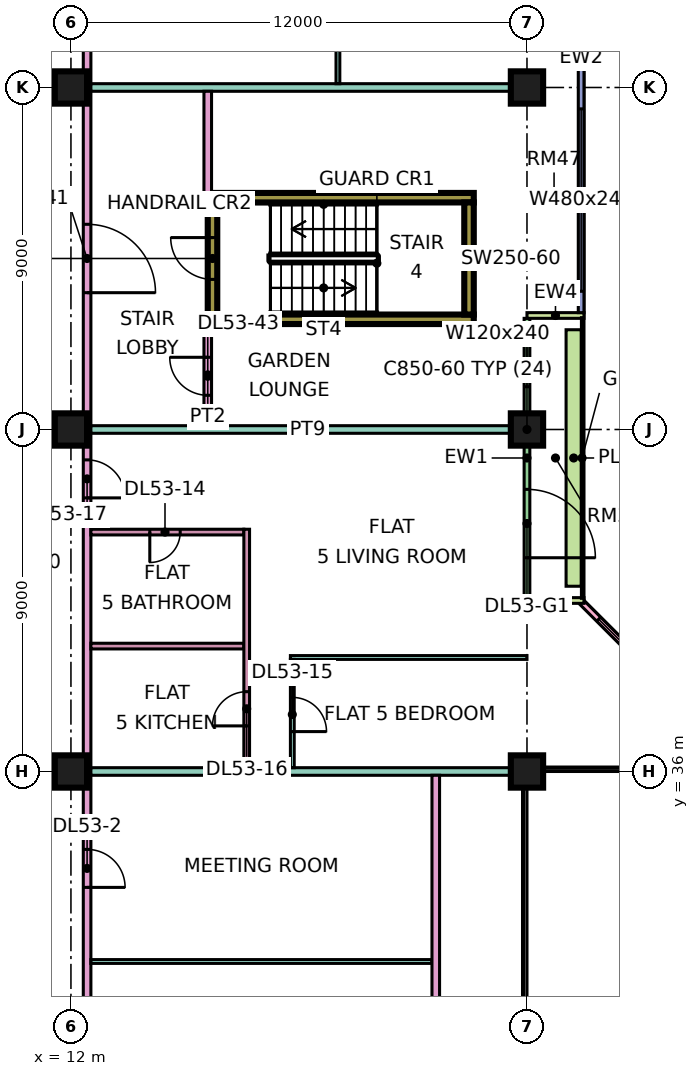
"""IFC4 building model, lengths in metres.
Left out: names, types, materials, properties, quantities, classifications, styles, units other than length and angle.
Written with IfcOpenShell. Run it as: python <this file> out.ifc"""

import sys

from ifc_helpers import new_model, si_unit, direction, frame, frame_2d, origin, origin_2d, place, context, subcontext, project, spatial, rectangle, extrude, element, fill, save


model = new_model("IFC4")
c1 = context("Model", 3, precision=1e-05, world=origin(), true_north=direction((0.0, 1.0)))
c2 = subcontext(c1, "Body", "Model", "MODEL_VIEW")
j1 = project(units=[si_unit("LENGTHUNIT", "METRE"), si_unit("PLANEANGLEUNIT", "RADIAN")], contexts=[c1])
p1 = place(None, origin())
s1 = spatial("IfcSite", under=j1, at=p1, CompositionType="ELEMENT")
p2 = place(p1, origin())
s2 = spatial("IfcBuilding", under=s1, at=p2, CompositionType="ELEMENT")
p3 = place(p2, frame((0.0, 0.0, 226.65)))
s3 = spatial("IfcBuildingStorey", under=s2, at=p3, CompositionType="ELEMENT", Elevation=226.65)
for number, where, z_axis, x_axis in (
    (1, (12.0, 36.0, 0.0), (0.0, 0.0, 1.0), (1.0, 0.0, 0.0)),
    (2, (12.0, 45.0, 0.0), (0.0, 0.0, 1.0), (1.0, 0.0, 0.0)),
    (3, (12.0, 54.0, 0.0), (0.0, 0.0, 1.0), (1.0, 0.0, 0.0)),
    (4, (24.0, 36.0, 0.0), (0.0, 0.0, 1.0), (1.0, 0.0, 0.0)),
    (5, (24.0, 45.0, 0.0), (0.0, 0.0, 1.0), (1.0, 0.0, 0.0)),
    (6, (24.0, 54.0, 0.0), (0.0, 0.0, 1.0), (1.0, 0.0, 0.0)),
):
    element("IfcColumn", number, at=place(p3, frame(where, z_axis=z_axis, x_axis=x_axis)), inside=s3, PredefinedType="COLUMN", context=c2, shape_type="SweptSolid", body=[
        extrude(rectangle(XDim=0.85, YDim=0.85, at=origin_2d()), origin(), (0.0, 0.0, 1.0), 3.75),
    ])
for number, where, z_axis, x_axis in (
    (7, (15.6, 47.9, 0.0), (0.0, 0.0, 1.0), (1.0, 0.0, 0.0)),
    (8, (15.6, 51.1, 0.0), (0.0, 0.0, 1.0), (1.0, 0.0, 0.0)),
):
    element("IfcWall", number, at=place(p3, frame(where, z_axis=z_axis, x_axis=x_axis)), inside=s3, PredefinedType="SHEAR", context=c2, shape_type="SweptSolid", body=[
        extrude(rectangle(XDim=7.0, YDim=0.25, at=frame_2d((3.5, 0.0))), origin(), (0.0, 0.0, 1.0), 3.75),
    ])
p4 = place(p3, frame((15.725, 48.025, 0.0), z_axis=(0.0, 0.0, 1.0), x_axis=(0.0, 1.0, 0.0)))
e9 = element("IfcWall", 9, at=p4, inside=s3, PredefinedType="SHEAR", context=c2, shape_type="SweptSolid", body=[
    extrude(rectangle(XDim=2.95, YDim=0.25, at=frame_2d((1.475, 0.0))), origin(), (0.0, 0.0, 1.0), 3.75),
])
p5 = place(p4, frame((0.925, 0.0, 0.0)))
e10 = element("IfcOpeningElement", 10, at=p5, cuts=e9, PredefinedType="OPENING", context=c2, shape_type="SweptSolid", body=[
    extrude(rectangle(XDim=1.1, YDim=2.2, at=frame_2d((0.55, 1.1))), frame((0.0, 0.135, 0.0), z_axis=(0.0, -1.0, 0.0), x_axis=(1.0, 0.0, 0.0)), (0.0, 0.0, 1.0), 0.27),
])
p6 = place(p3, frame((22.475, 48.025, 0.0), z_axis=(0.0, 0.0, 1.0), x_axis=(0.0, 1.0, 0.0)))
e11 = element("IfcWall", 11, at=p6, inside=s3, PredefinedType="SHEAR", context=c2, shape_type="SweptSolid", body=[
    extrude(rectangle(XDim=2.95, YDim=0.25, at=frame_2d((1.475, 0.0))), origin(), (0.0, 0.0, 1.0), 3.75),
])
p7 = place(p3, frame((28.447, 37.447, 0.0), z_axis=(0.0, 0.0, 1.0), x_axis=(-0.707106781187, 0.707106781187, 0.0)))
e12 = element("IfcWall", 12, at=p7, inside=s3, PredefinedType="SOLIDWALL", context=c2, shape_type="SweptSolid", body=[
    extrude(rectangle(XDim=4.243, YDim=0.15, at=frame_2d((2.121, 0.0))), origin(), (0.0, 0.0, 1.0), 3.35),
])
p8 = place(p7, frame((0.621, 0.0, 0.45)))
e13 = element("IfcOpeningElement", 13, at=p8, cuts=e12, PredefinedType="OPENING", context=c2, shape_type="SweptSolid", body=[
    extrude(rectangle(XDim=3.0, YDim=2.4, at=frame_2d((1.5, 1.2))), frame((0.0, 0.085, 0.0), z_axis=(0.0, -1.0, 0.0), x_axis=(1.0, 0.0, 0.0)), (0.0, 0.0, 1.0), 0.17),
])
p9 = place(p3, frame((24.0, 40.575, 0.0), z_axis=(0.0, 0.0, 1.0), x_axis=(0.0, 1.0, 0.0)))
e14 = element("IfcWall", 14, at=p9, inside=s3, PredefinedType="SOLIDWALL", context=c2, shape_type="SweptSolid", body=[
    extrude(rectangle(XDim=7.35, YDim=0.15, at=frame_2d((3.675, 0.0))), origin(), (0.0, 0.0, 1.0), 3.35),
])
p10 = place(p9, frame((1.05, 0.0, 0.0)))
e15 = element("IfcOpeningElement", 15, at=p10, cuts=e14, PredefinedType="OPENING", context=c2, shape_type="SweptSolid", body=[
    extrude(rectangle(XDim=1.8, YDim=2.4, at=frame_2d((0.9, 1.2))), frame((0.0, 0.085, 0.0), z_axis=(0.0, -1.0, 0.0), x_axis=(1.0, 0.0, 0.0)), (0.0, 0.0, 1.0), 0.17),
])
p11 = place(p9, frame((5.55, 0.0, 0.45)))
e16 = element("IfcOpeningElement", 16, at=p11, cuts=e14, PredefinedType="OPENING", context=c2, shape_type="SweptSolid", body=[
    extrude(rectangle(XDim=1.2, YDim=2.4, at=frame_2d((0.6, 1.2))), frame((0.0, 0.085, 0.0), z_axis=(0.0, -1.0, 0.0), x_axis=(1.0, 0.0, 0.0)), (0.0, 0.0, 1.0), 0.17),
])
for number, where, z_axis, x_axis in (
    (17, (25.5, 40.5, 0.0), (0.0, 0.0, 1.0), (-1.0, 0.0, 0.0)),
    (18, (25.5, 48.0, 0.0), (0.0, 0.0, 1.0), (-1.0, 0.0, 0.0)),
):
    element("IfcWall", number, at=place(p3, frame(where, z_axis=z_axis, x_axis=x_axis)), inside=s3, PredefinedType="SOLIDWALL", context=c2, shape_type="SweptSolid", body=[
        extrude(rectangle(XDim=1.5, YDim=0.15, at=frame_2d((0.75, 0.0))), origin(), (0.0, 0.0, 1.0), 3.35),
    ])
p12 = place(p3, frame((25.425, 48.075, 0.0), z_axis=(0.0, 0.0, 1.0), x_axis=(0.0, 1.0, 0.0)))
e19 = element("IfcWall", 19, at=p12, inside=s3, PredefinedType="SOLIDWALL", context=c2, shape_type="SweptSolid", body=[
    extrude(rectangle(XDim=13.425, YDim=0.15, at=frame_2d((6.712, 0.0))), origin(), (0.0, 0.0, 1.0), 3.35),
])
p13 = place(p12, frame((0.562, 0.0, 0.45)))
e20 = element("IfcOpeningElement", 20, at=p13, cuts=e19, PredefinedType="OPENING", context=c2, shape_type="SweptSolid", body=[
    extrude(rectangle(XDim=4.8, YDim=2.4, at=frame_2d((2.4, 1.2))), frame((0.0, 0.085, 0.0), z_axis=(0.0, -1.0, 0.0), x_axis=(1.0, 0.0, 0.0)), (0.0, 0.0, 1.0), 0.17),
])
p14 = place(p12, frame((6.525, 0.0, 0.45)))
e21 = element("IfcOpeningElement", 21, at=p14, cuts=e19, PredefinedType="OPENING", context=c2, shape_type="SweptSolid", body=[
    extrude(rectangle(XDim=1.8, YDim=2.4, at=frame_2d((0.9, 1.2))), frame((0.0, 0.085, 0.0), z_axis=(0.0, -1.0, 0.0), x_axis=(1.0, 0.0, 0.0)), (0.0, 0.0, 1.0), 0.17),
])
p15 = place(p12, frame((9.675, 0.0, 0.45)))
e22 = element("IfcOpeningElement", 22, at=p15, cuts=e19, PredefinedType="OPENING", context=c2, shape_type="SweptSolid", body=[
    extrude(rectangle(XDim=3.0, YDim=2.4, at=frame_2d((1.5, 1.2))), frame((0.0, 0.085, 0.0), z_axis=(0.0, -1.0, 0.0), x_axis=(1.0, 0.0, 0.0)), (0.0, 0.0, 1.0), 0.17),
])
p16 = place(p3, frame((25.229, 40.875, 0.0), z_axis=(0.0, 0.0, 1.0), x_axis=(0.0, 1.0, 0.0)))
e23 = element("IfcWall", 23, at=p16, inside=s3, PredefinedType="SOLIDWALL", context=c2, shape_type="SweptSolid", body=[
    extrude(rectangle(XDim=6.75, YDim=0.4, at=frame_2d((3.375, 0.0))), origin(), (0.0, 0.0, 1.0), 0.7),
])
p17 = place(p3, frame((12.425, 20.0, 0.0), z_axis=(0.0, 0.0, 1.0), x_axis=(0.0, 1.0, 0.0)))
e24 = element("IfcWall", 24, at=p17, inside=s3, PredefinedType="PARTITIONING", context=c2, shape_type="SweptSolid", body=[
    extrude(rectangle(XDim=42.926, YDim=0.2, at=frame_2d((21.463, 0.0))), origin(), (0.0, 0.0, 1.0), 3.35),
])
p18 = place(p17, frame((6.7, 0.0, 0.0)))
e25 = element("IfcOpeningElement", 25, at=p18, cuts=e24, PredefinedType="OPENING", context=c2, shape_type="SweptSolid", body=[
    extrude(rectangle(XDim=1.6, YDim=2.1, at=frame_2d((0.8, 1.05))), frame((0.0, 0.11, 0.0), z_axis=(0.0, -1.0, 0.0), x_axis=(1.0, 0.0, 0.0)), (0.0, 0.0, 1.0), 0.22),
])
p19 = place(p17, frame((12.95, 0.0, 0.0)))
e26 = element("IfcOpeningElement", 26, at=p19, cuts=e24, PredefinedType="OPENING", context=c2, shape_type="SweptSolid", body=[
    extrude(rectangle(XDim=1.0, YDim=2.1, at=frame_2d((0.5, 1.05))), frame((0.0, 0.11, 0.0), z_axis=(0.0, -1.0, 0.0), x_axis=(1.0, 0.0, 0.0)), (0.0, 0.0, 1.0), 0.22),
])
p20 = place(p17, frame((23.2, 0.0, 0.0)))
e27 = element("IfcOpeningElement", 27, at=p20, cuts=e24, PredefinedType="OPENING", context=c2, shape_type="SweptSolid", body=[
    extrude(rectangle(XDim=1.0, YDim=2.1, at=frame_2d((0.5, 1.05))), frame((0.0, 0.11, 0.0), z_axis=(0.0, -1.0, 0.0), x_axis=(1.0, 0.0, 0.0)), (0.0, 0.0, 1.0), 0.22),
])
p21 = place(p17, frame((35.35, 0.0, 0.0)))
e28 = element("IfcOpeningElement", 28, at=p21, cuts=e24, PredefinedType="OPENING", context=c2, shape_type="SweptSolid", body=[
    extrude(rectangle(XDim=1.0, YDim=2.1, at=frame_2d((0.5, 1.05))), frame((0.0, 0.11, 0.0), z_axis=(0.0, -1.0, 0.0), x_axis=(1.0, 0.0, 0.0)), (0.0, 0.0, 1.0), 0.22),
])
p22 = place(p17, frame((1.15, 0.0, 0.0)))
e29 = element("IfcOpeningElement", 29, at=p22, cuts=e24, PredefinedType="OPENING", context=c2, shape_type="SweptSolid", body=[
    extrude(rectangle(XDim=1.8, YDim=2.1, at=frame_2d((0.9, 1.05))), frame((0.0, 0.11, 0.0), z_axis=(0.0, -1.0, 0.0), x_axis=(1.0, 0.0, 0.0)), (0.0, 0.0, 1.0), 0.22),
])
p23 = place(p17, frame((28.6, 0.0, 0.0)))
e30 = element("IfcOpeningElement", 30, at=p23, cuts=e24, PredefinedType="OPENING", context=c2, shape_type="SweptSolid", body=[
    extrude(rectangle(XDim=1.8, YDim=2.1, at=frame_2d((0.9, 1.05))), frame((0.0, 0.11, 0.0), z_axis=(0.0, -1.0, 0.0), x_axis=(1.0, 0.0, 0.0)), (0.0, 0.0, 1.0), 0.22),
])
p24 = place(p3, frame((12.525, 31.0, 0.0), z_axis=(0.0, 0.0, 1.0), x_axis=(1.0, 0.0, 0.0)))
e31 = element("IfcWall", 31, at=p24, inside=s3, PredefinedType="PARTITIONING", context=c2, shape_type="SweptSolid", body=[
    extrude(rectangle(XDim=8.975, YDim=0.1, at=frame_2d((4.488, 0.0))), origin(), (0.0, 0.0, 1.0), 3.35),
])
p25 = place(p3, frame((12.525, 36.0, 0.0), z_axis=(0.0, 0.0, 1.0), x_axis=(1.0, 0.0, 0.0)))
e32 = element("IfcWall", 32, at=p25, inside=s3, PredefinedType="PARTITIONING", context=c2, shape_type="SweptSolid", body=[
    extrude(rectangle(XDim=11.475, YDim=0.2, at=frame_2d((5.738, 0.0))), origin(), (0.0, 0.0, 1.0), 3.35),
])
p26 = place(p3, frame((12.525, 39.3, 0.0), z_axis=(0.0, 0.0, 1.0), x_axis=(1.0, 0.0, 0.0)))
e33 = element("IfcWall", 33, at=p26, inside=s3, PredefinedType="PARTITIONING", context=c2, shape_type="SweptSolid", body=[
    extrude(rectangle(XDim=4.025, YDim=0.15, at=frame_2d((2.013, 0.0))), origin(), (0.0, 0.0, 1.0), 3.35),
])
p27 = place(p3, frame((12.525, 42.3, 0.0), z_axis=(0.0, 0.0, 1.0), x_axis=(1.0, 0.0, 0.0)))
e34 = element("IfcWall", 34, at=p27, inside=s3, PredefinedType="PARTITIONING", context=c2, shape_type="SweptSolid", body=[
    extrude(rectangle(XDim=4.025, YDim=0.15, at=frame_2d((2.013, 0.0))), origin(), (0.0, 0.0, 1.0), 3.35),
])
p28 = place(p27, frame((1.55, 0.0, 0.0)))
e35 = element("IfcOpeningElement", 35, at=p28, cuts=e34, PredefinedType="OPENING", context=c2, shape_type="SweptSolid", body=[
    extrude(rectangle(XDim=0.8, YDim=2.1, at=frame_2d((0.4, 1.05))), frame((0.0, 0.085, 0.0), z_axis=(0.0, -1.0, 0.0), x_axis=(1.0, 0.0, 0.0)), (0.0, 0.0, 1.0), 0.17),
])
p29 = place(p3, frame((12.525, 45.0, 0.0), z_axis=(0.0, 0.0, 1.0), x_axis=(1.0, 0.0, 0.0)))
e36 = element("IfcWall", 36, at=p29, inside=s3, PredefinedType="PARTITIONING", context=c2, shape_type="SweptSolid", body=[
    extrude(rectangle(XDim=11.401, YDim=0.2, at=frame_2d((5.701, 0.0))), origin(), (0.0, 0.0, 1.0), 3.35),
])
p30 = place(p3, frame((12.525, 54.0, 0.0), z_axis=(0.0, 0.0, 1.0), x_axis=(1.0, 0.0, 0.0)))
e37 = element("IfcWall", 37, at=p30, inside=s3, PredefinedType="PARTITIONING", context=c2, shape_type="SweptSolid", body=[
    extrude(rectangle(XDim=11.475, YDim=0.2, at=frame_2d((5.738, 0.0))), origin(), (0.0, 0.0, 1.0), 3.35),
])
p31 = place(p3, frame((15.6, 45.1, 0.0), z_axis=(0.0, 0.0, 1.0), x_axis=(0.0, 1.0, 0.0)))
e38 = element("IfcWall", 38, at=p31, inside=s3, PredefinedType="PARTITIONING", context=c2, shape_type="SweptSolid", body=[
    extrude(rectangle(XDim=2.675, YDim=0.2, at=frame_2d((1.337, 0.0))), origin(), (0.0, 0.0, 1.0), 3.35),
])
p32 = place(p31, frame((0.8, 0.0, 0.0)))
e39 = element("IfcOpeningElement", 39, at=p32, cuts=e38, PredefinedType="OPENING", context=c2, shape_type="SweptSolid", body=[
    extrude(rectangle(XDim=1.0, YDim=2.1, at=frame_2d((0.5, 1.05))), frame((0.0, 0.11, 0.0), z_axis=(0.0, -1.0, 0.0), x_axis=(1.0, 0.0, 0.0)), (0.0, 0.0, 1.0), 0.22),
])
p33 = place(p3, frame((15.6, 51.225, 0.0), z_axis=(0.0, 0.0, 1.0), x_axis=(0.0, 1.0, 0.0)))
e40 = element("IfcWall", 40, at=p33, inside=s3, PredefinedType="PARTITIONING", context=c2, shape_type="SweptSolid", body=[
    extrude(rectangle(XDim=2.675, YDim=0.2, at=frame_2d((1.337, 0.0))), origin(), (0.0, 0.0, 1.0), 3.35),
])
p34 = place(p3, frame((16.625, 36.1, 0.0), z_axis=(0.0, 0.0, 1.0), x_axis=(0.0, 1.0, 0.0)))
e41 = element("IfcWall", 41, at=p34, inside=s3, PredefinedType="PARTITIONING", context=c2, shape_type="SweptSolid", body=[
    extrude(rectangle(XDim=6.275, YDim=0.15, at=frame_2d((3.137, 0.0))), origin(), (0.0, 0.0, 1.0), 3.35),
])
p35 = place(p34, frame((1.1, 0.0, 0.0)))
e42 = element("IfcOpeningElement", 42, at=p35, cuts=e41, PredefinedType="OPENING", context=c2, shape_type="SweptSolid", body=[
    extrude(rectangle(XDim=0.9, YDim=2.1, at=frame_2d((0.45, 1.05))), frame((0.0, 0.085, 0.0), z_axis=(0.0, -1.0, 0.0), x_axis=(1.0, 0.0, 0.0)), (0.0, 0.0, 1.0), 0.17),
])
p36 = place(p3, frame((17.775, 39.0, 0.0), z_axis=(0.0, 0.0, 1.0), x_axis=(1.0, 0.0, 0.0)))
e43 = element("IfcWall", 43, at=p36, inside=s3, PredefinedType="PARTITIONING", context=c2, shape_type="SweptSolid", body=[
    extrude(rectangle(XDim=6.225, YDim=0.1, at=frame_2d((3.113, 0.0))), origin(), (0.0, 0.0, 1.0), 3.35),
])
p37 = place(p3, frame((17.825, 36.1, 0.0), z_axis=(0.0, 0.0, 1.0), x_axis=(0.0, 1.0, 0.0)))
e44 = element("IfcWall", 44, at=p37, inside=s3, PredefinedType="PARTITIONING", context=c2, shape_type="SweptSolid", body=[
    extrude(rectangle(XDim=2.85, YDim=0.1, at=frame_2d((1.425, 0.0))), origin(), (0.0, 0.0, 1.0), 3.35),
])
p38 = place(p37, frame((0.95, 0.0, 0.0)))
e45 = element("IfcOpeningElement", 45, at=p38, cuts=e44, PredefinedType="OPENING", context=c2, shape_type="SweptSolid", body=[
    extrude(rectangle(XDim=0.9, YDim=2.1, at=frame_2d((0.45, 1.05))), frame((0.0, 0.06, 0.0), z_axis=(0.0, -1.0, 0.0), x_axis=(1.0, 0.0, 0.0)), (0.0, 0.0, 1.0), 0.12),
])
p39 = place(p3, frame((19.025, 54.1, 0.0), z_axis=(0.0, 0.0, 1.0), x_axis=(0.0, 1.0, 0.0)))
e46 = element("IfcWall", 46, at=p39, inside=s3, PredefinedType="PARTITIONING", context=c2, shape_type="SweptSolid", body=[
    extrude(rectangle(XDim=2.85, YDim=0.1, at=frame_2d((1.425, 0.0))), origin(), (0.0, 0.0, 1.0), 3.35),
])
p40 = place(p39, frame((0.95, 0.0, 0.0)))
e47 = element("IfcOpeningElement", 47, at=p40, cuts=e46, PredefinedType="OPENING", context=c2, shape_type="SweptSolid", body=[
    extrude(rectangle(XDim=0.9, YDim=2.1, at=frame_2d((0.45, 1.05))), frame((0.0, 0.06, 0.0), z_axis=(0.0, -1.0, 0.0), x_axis=(1.0, 0.0, 0.0)), (0.0, 0.0, 1.0), 0.12),
])
p41 = place(p3, frame((21.6, 23.9, 0.0), z_axis=(0.0, 0.0, 1.0), x_axis=(0.0, 1.0, 0.0)))
e48 = element("IfcWall", 48, at=p41, inside=s3, PredefinedType="PARTITIONING", context=c2, shape_type="SweptSolid", body=[
    extrude(rectangle(XDim=12.0, YDim=0.2, at=frame_2d((6.0, 0.0))), origin(), (0.0, 0.0, 1.0), 3.35),
])
p42 = place(p8, origin())
e49 = element("IfcWindow", 49, at=p42, inside=s3, PartitioningType="SINGLE_PANEL", PredefinedType="WINDOW", context=c2, shape_type="SweptSolid", body=[
    extrude(rectangle(XDim=3.0, YDim=2.4, at=frame_2d((1.5, 1.2))), frame((0.0, 0.03, 0.0), z_axis=(0.0, -1.0, 0.0), x_axis=(1.0, 0.0, 0.0)), (0.0, 0.0, 1.0), 0.06),
])
fill(e13, e49)
p43 = place(p10, frame((1.8, 0.0, 0.0), z_axis=(0.0, 0.0, 1.0), x_axis=(-1.0, 0.0, 0.0)))
e50 = element("IfcDoor", 50, at=p43, inside=s3, OperationType="DOUBLE_DOOR_SINGLE_SWING", PredefinedType="DOOR", context=c2, shape_type="SweptSolid", body=[
    extrude(rectangle(XDim=1.8, YDim=2.4, at=frame_2d((0.9, 1.2))), frame((0.0, 0.025, 0.0), z_axis=(0.0, -1.0, 0.0), x_axis=(1.0, 0.0, 0.0)), (0.0, 0.0, 1.0), 0.05),
])
fill(e15, e50)
p44 = place(p11, origin())
e51 = element("IfcWindow", 51, at=p44, inside=s3, PartitioningType="SINGLE_PANEL", PredefinedType="WINDOW", context=c2, shape_type="SweptSolid", body=[
    extrude(rectangle(XDim=1.2, YDim=2.4, at=frame_2d((0.6, 1.2))), frame((0.0, 0.03, 0.0), z_axis=(0.0, -1.0, 0.0), x_axis=(1.0, 0.0, 0.0)), (0.0, 0.0, 1.0), 0.06),
])
fill(e16, e51)
p45 = place(p13, origin())
e52 = element("IfcWindow", 52, at=p45, inside=s3, PartitioningType="SINGLE_PANEL", PredefinedType="WINDOW", context=c2, shape_type="SweptSolid", body=[
    extrude(rectangle(XDim=4.8, YDim=2.4, at=frame_2d((2.4, 1.2))), frame((0.0, 0.03, 0.0), z_axis=(0.0, -1.0, 0.0), x_axis=(1.0, 0.0, 0.0)), (0.0, 0.0, 1.0), 0.06),
])
fill(e20, e52)
p46 = place(p14, origin())
e53 = element("IfcWindow", 53, at=p46, inside=s3, PartitioningType="SINGLE_PANEL", PredefinedType="WINDOW", context=c2, shape_type="SweptSolid", body=[
    extrude(rectangle(XDim=1.8, YDim=2.4, at=frame_2d((0.9, 1.2))), frame((0.0, 0.03, 0.0), z_axis=(0.0, -1.0, 0.0), x_axis=(1.0, 0.0, 0.0)), (0.0, 0.0, 1.0), 0.06),
])
fill(e21, e53)
p47 = place(p5, frame((1.1, 0.0, 0.0), z_axis=(0.0, 0.0, 1.0), x_axis=(-1.0, 0.0, 0.0)))
e54 = element("IfcDoor", 54, at=p47, inside=s3, OperationType="SINGLE_SWING_RIGHT", PredefinedType="DOOR", context=c2, shape_type="SweptSolid", body=[
    extrude(rectangle(XDim=1.1, YDim=2.2, at=frame_2d((0.55, 1.1))), frame((0.0, 0.025, 0.0), z_axis=(0.0, -1.0, 0.0), x_axis=(1.0, 0.0, 0.0)), (0.0, 0.0, 1.0), 0.05),
])
fill(e10, e54)
p48 = place(p19, frame((1.0, 0.0, 0.0), z_axis=(0.0, 0.0, 1.0), x_axis=(-1.0, 0.0, 0.0)))
e55 = element("IfcDoor", 55, at=p48, inside=s3, OperationType="SINGLE_SWING_LEFT", PredefinedType="DOOR", context=c2, shape_type="SweptSolid", body=[
    extrude(rectangle(XDim=1.0, YDim=2.1, at=frame_2d((0.5, 1.05))), frame((0.0, 0.025, 0.0), z_axis=(0.0, -1.0, 0.0), x_axis=(1.0, 0.0, 0.0)), (0.0, 0.0, 1.0), 0.05),
])
fill(e26, e55)
p49 = place(p28, frame((0.8, 0.0, 0.0), z_axis=(0.0, 0.0, 1.0), x_axis=(-1.0, 0.0, 0.0)))
e56 = element("IfcDoor", 56, at=p49, inside=s3, OperationType="SINGLE_SWING_LEFT", PredefinedType="DOOR", context=c2, shape_type="SweptSolid", body=[
    extrude(rectangle(XDim=0.8, YDim=2.1, at=frame_2d((0.4, 1.05))), frame((0.0, 0.025, 0.0), z_axis=(0.0, -1.0, 0.0), x_axis=(1.0, 0.0, 0.0)), (0.0, 0.0, 1.0), 0.05),
])
fill(e35, e56)
p50 = place(p38, frame((0.9, 0.0, 0.0), z_axis=(0.0, 0.0, 1.0), x_axis=(-1.0, 0.0, 0.0)))
e57 = element("IfcDoor", 57, at=p50, inside=s3, OperationType="SINGLE_SWING_LEFT", PredefinedType="DOOR", context=c2, shape_type="SweptSolid", body=[
    extrude(rectangle(XDim=0.9, YDim=2.1, at=frame_2d((0.45, 1.05))), frame((0.0, 0.025, 0.0), z_axis=(0.0, -1.0, 0.0), x_axis=(1.0, 0.0, 0.0)), (0.0, 0.0, 1.0), 0.05),
])
fill(e45, e57)
p51 = place(p35, origin())
e58 = element("IfcDoor", 58, at=p51, inside=s3, OperationType="SINGLE_SWING_LEFT", PredefinedType="DOOR", context=c2, shape_type="SweptSolid", body=[
    extrude(rectangle(XDim=0.9, YDim=2.1, at=frame_2d((0.45, 1.05))), frame((0.0, 0.025, 0.0), z_axis=(0.0, -1.0, 0.0), x_axis=(1.0, 0.0, 0.0)), (0.0, 0.0, 1.0), 0.05),
])
fill(e42, e58)
p52 = place(p20, frame((1.0, 0.0, 0.0), z_axis=(0.0, 0.0, 1.0), x_axis=(-1.0, 0.0, 0.0)))
e59 = element("IfcDoor", 59, at=p52, inside=s3, OperationType="SINGLE_SWING_LEFT", PredefinedType="DOOR", context=c2, shape_type="SweptSolid", body=[
    extrude(rectangle(XDim=1.0, YDim=2.1, at=frame_2d((0.5, 1.05))), frame((0.0, 0.025, 0.0), z_axis=(0.0, -1.0, 0.0), x_axis=(1.0, 0.0, 0.0)), (0.0, 0.0, 1.0), 0.05),
])
fill(e27, e59)
p53 = place(p23, frame((1.8, 0.0, 0.0), z_axis=(0.0, 0.0, 1.0), x_axis=(-1.0, 0.0, 0.0)))
e60 = element("IfcDoor", 60, at=p53, inside=s3, OperationType="DOUBLE_DOOR_SINGLE_SWING", PredefinedType="DOOR", context=c2, shape_type="SweptSolid", body=[
    extrude(rectangle(XDim=1.8, YDim=2.1, at=frame_2d((0.9, 1.05))), frame((0.0, 0.025, 0.0), z_axis=(0.0, -1.0, 0.0), x_axis=(1.0, 0.0, 0.0)), (0.0, 0.0, 1.0), 0.05),
])
fill(e30, e60)
p54 = place(p32, frame((1.0, 0.0, 0.0), z_axis=(0.0, 0.0, 1.0), x_axis=(-1.0, 0.0, 0.0)))
e61 = element("IfcDoor", 61, at=p54, inside=s3, OperationType="SINGLE_SWING_RIGHT", PredefinedType="DOOR", context=c2, shape_type="SweptSolid", body=[
    extrude(rectangle(XDim=1.0, YDim=2.1, at=frame_2d((0.5, 1.05))), frame((0.0, 0.025, 0.0), z_axis=(0.0, -1.0, 0.0), x_axis=(1.0, 0.0, 0.0)), (0.0, 0.0, 1.0), 0.05),
])
fill(e39, e61)
save(model, sys.argv[1])
